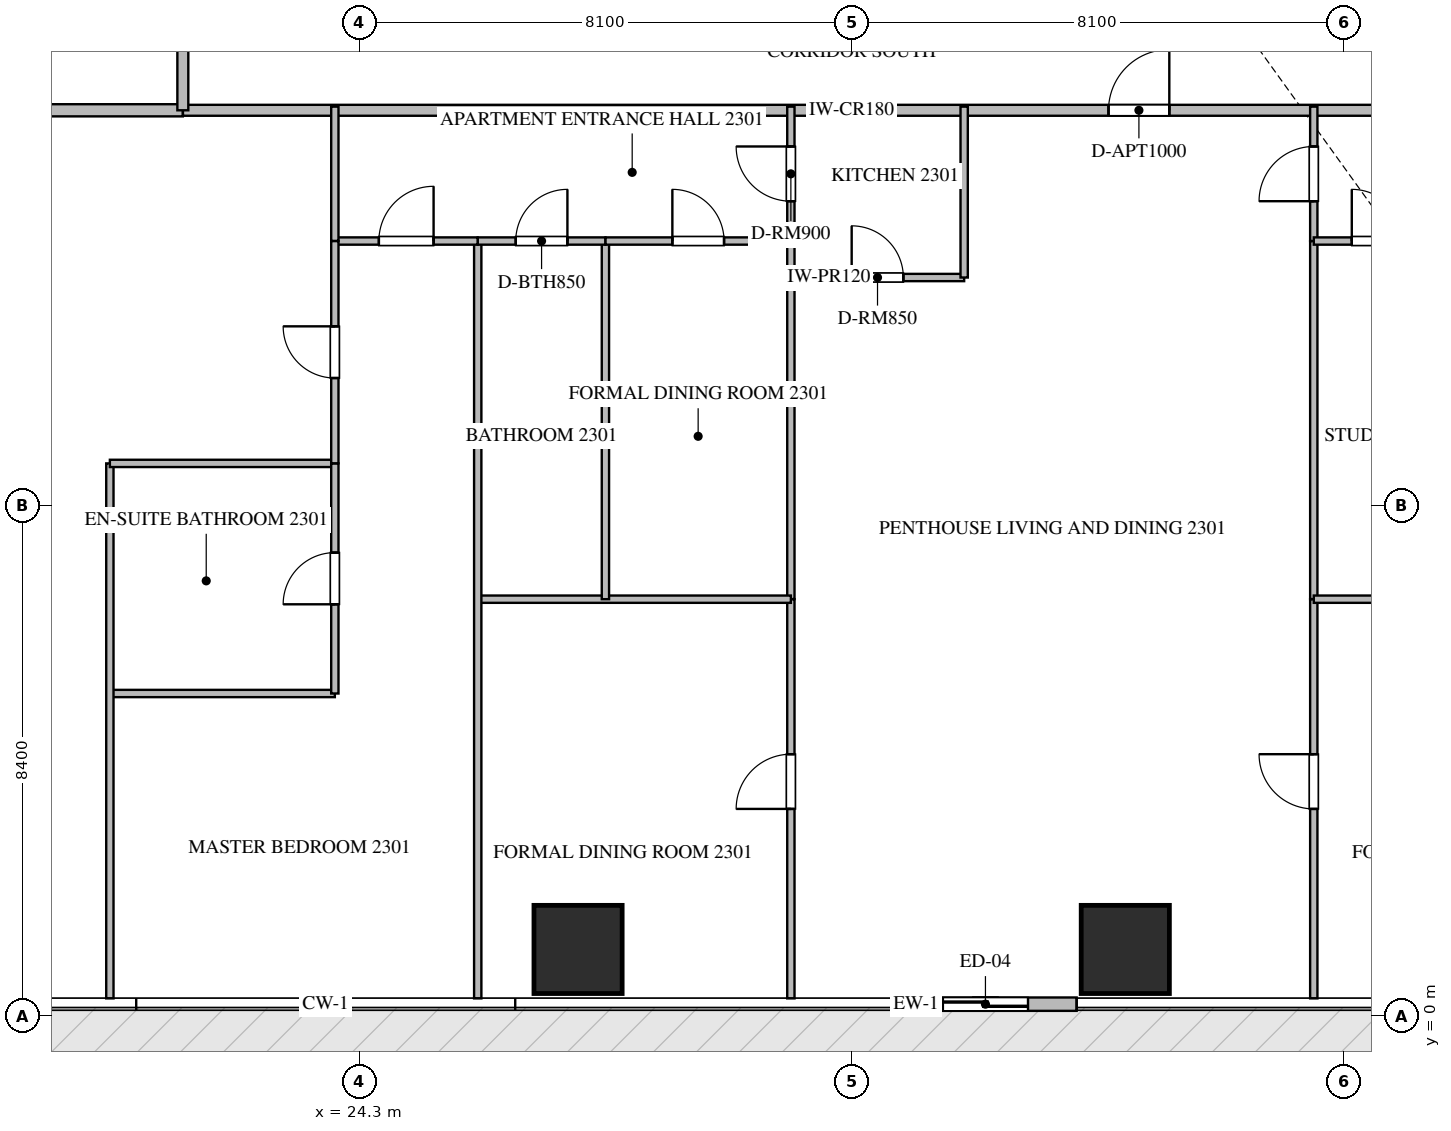
"""IFC4 building model, lengths in metres.
Left out: names, types, materials, properties, quantities, classifications, styles, units other than length and angle.
Written with IfcOpenShell. Run it as: python <this file> out.ifc"""

import sys

from ifc_helpers import new_model, si_unit, direction, frame, frame_2d, origin, origin_2d, place, context, subcontext, project, spatial, rectangle, extrude, source, transform, mapped, element, fill, save


model = new_model("IFC4")
c1 = context("Model", 3, precision=1e-05, world=origin(), true_north=direction((0.0, 1.0)))
c2 = subcontext(c1, "Body", "Model", "MODEL_VIEW")
j1 = project(units=[si_unit("LENGTHUNIT", "METRE"), si_unit("PLANEANGLEUNIT", "RADIAN")], contexts=[c1])
p1 = place(None, origin())
s1 = spatial("IfcSite", under=j1, at=p1, CompositionType="ELEMENT")
p2 = place(p1, origin())
s2 = spatial("IfcBuilding", under=s1, at=p2, CompositionType="ELEMENT")
p3 = place(p2, frame((0.0, 0.0, 94.2)))
s3 = spatial("IfcBuildingStorey", under=s2, at=p3, CompositionType="ELEMENT", Elevation=94.2)
m1 = source(origin(), c2, "Body", "SweptSolid", [
    extrude(rectangle(XDim=1.45, YDim=1.45, at=origin_2d()), origin(), (0.0, 0.0, 1.0), 3.75),
])
for number, where, z_axis, x_axis in (
    (1, (27.9, 1.1, -0.26), (0.0, 0.0, 1.0), (1.0, 0.0, 0.0)),
    (2, (36.9, 1.1, -0.26), (0.0, 0.0, 1.0), (1.0, 0.0, 0.0)),
):
    element("IfcColumn", number, at=place(p3, frame(where, z_axis=z_axis, x_axis=x_axis)), inside=s3, PredefinedType="COLUMN", context=c2, shape_type="MappedRepresentation", body=[
        mapped(m1, transform((0.0, 0.0, 0.0), scale=1.0)),
    ])
p4 = place(p3, frame((33.1, 0.2, 0.0), z_axis=(0.0, 0.0, 1.0), x_axis=(1.0, 0.0, 0.0)))
e3 = element("IfcWall", 3, at=p4, inside=s3, PredefinedType="ELEMENTEDWALL", context=c2, shape_type="SweptSolid", body=[
    extrude(rectangle(XDim=3.0, YDim=0.22, at=frame_2d((1.5, 0.0))), origin(), (0.0, 0.0, 1.0), 3.475),
])
p5 = place(p4, frame((0.8, 0.0, 0.0)))
e4 = element("IfcOpeningElement", 4, at=p5, cuts=e3, PredefinedType="OPENING", context=c2, shape_type="SweptSolid", body=[
    extrude(rectangle(XDim=1.4, YDim=2.25, at=frame_2d((0.7, 1.125))), frame((0.0, 0.12, 0.0), z_axis=(0.0, -1.0, 0.0), x_axis=(1.0, 0.0, 0.0)), (0.0, 0.0, 1.0), 0.24),
])
p6 = place(p3, frame((6.082, 14.9, 0.0), z_axis=(0.0, 0.0, 1.0), x_axis=(1.0, 0.0, 0.0)))
e5 = element("IfcWall", 5, at=p6, inside=s3, PredefinedType="PARTITIONING", context=c2, shape_type="SweptSolid", body=[
    extrude(rectangle(XDim=15.318, YDim=0.2, at=frame_2d((7.659, 0.0))), origin(), (0.0, 0.0, 1.0), 3.49),
])
p7 = place(p3, frame((21.402, 14.9, 0.0), z_axis=(0.0, 0.0, 1.0), x_axis=(1.0, 0.0, 0.0)))
e6 = element("IfcWall", 6, at=p7, inside=s3, PredefinedType="PARTITIONING", context=c2, shape_type="SweptSolid", body=[
    extrude(rectangle(XDim=21.996, YDim=0.18, at=frame_2d((10.998, 0.0))), origin(), (0.0, 0.0, 1.0), 3.49),
])
p8 = place(p7, frame((15.222, 0.0, 0.0)))
e7 = element("IfcOpeningElement", 7, at=p8, cuts=e6, PredefinedType="OPENING", context=c2, shape_type="SweptSolid", body=[
    extrude(rectangle(XDim=1.0, YDim=2.15, at=frame_2d((0.5, 1.075))), frame((0.0, 0.1, 0.0), z_axis=(0.0, -1.0, 0.0), x_axis=(1.0, 0.0, 0.0)), (0.0, 0.0, 1.0), 0.2),
])
p9 = place(p3, frame((21.4, 14.9, 0.0), z_axis=(0.0, 0.0, 1.0), x_axis=(0.0, 1.0, 0.0)))
e8 = element("IfcWall", 8, at=p9, inside=s3, PredefinedType="PARTITIONING", context=c2, shape_type="SweptSolid", body=[
    extrude(rectangle(XDim=20.6, YDim=0.18, at=frame_2d((10.3, 0.0))), origin(), (0.0, 0.0, 1.0), 3.49),
])
p10 = place(p9, frame((1.96, 0.0, 0.0)))
e9 = element("IfcOpeningElement", 9, at=p10, cuts=e8, PredefinedType="OPENING", context=c2, shape_type="SweptSolid", body=[
    extrude(rectangle(XDim=1.0, YDim=2.15, at=frame_2d((0.5, 1.075))), frame((0.0, 0.1, 0.0), z_axis=(0.0, -1.0, 0.0), x_axis=(1.0, 0.0, 0.0)), (0.0, 0.0, 1.0), 0.2),
])
p11 = place(p3, frame((31.4, 12.15, 0.0), z_axis=(0.0, 0.0, 1.0), x_axis=(1.0, 0.0, 0.0)))
e10 = element("IfcWall", 10, at=p11, inside=s3, PredefinedType="PARTITIONING", context=c2, shape_type="SweptSolid", body=[
    extrude(rectangle(XDim=2.85, YDim=0.12, at=frame_2d((1.425, 0.0))), origin(), (0.0, 0.0, 1.0), 3.49),
])
p12 = place(p11, frame((1.0, 0.0, 0.0)))
e11 = element("IfcOpeningElement", 11, at=p12, cuts=e10, PredefinedType="OPENING", context=c2, shape_type="SweptSolid", body=[
    extrude(rectangle(XDim=0.85, YDim=2.1, at=frame_2d((0.425, 1.05))), frame((0.0, 0.07, 0.0), z_axis=(0.0, -1.0, 0.0), x_axis=(1.0, 0.0, 0.0)), (0.0, 0.0, 1.0), 0.14),
])
p13 = place(p3, frame((34.25, 12.15, 0.0), z_axis=(0.0, 0.0, 1.0), x_axis=(0.0, 1.0, 0.0)))
e12 = element("IfcWall", 12, at=p13, inside=s3, PredefinedType="PARTITIONING", context=c2, shape_type="SweptSolid", body=[
    extrude(rectangle(XDim=2.81, YDim=0.12, at=frame_2d((1.405, 0.0))), origin(), (0.0, 0.0, 1.0), 3.49),
])
p14 = place(p3, frame((31.4, 12.75, 0.0), z_axis=(0.0, 0.0, 1.0), x_axis=(0.0, 1.0, 0.0)))
e13 = element("IfcWall", 13, at=p14, inside=s3, PredefinedType="PARTITIONING", context=c2, shape_type="SweptSolid", body=[
    extrude(rectangle(XDim=2.21, YDim=0.12, at=frame_2d((1.105, 0.0))), origin(), (0.0, 0.0, 1.0), 3.49),
])
p15 = place(p14, frame((0.655, 0.0, 0.0)))
e14 = element("IfcOpeningElement", 14, at=p15, cuts=e13, PredefinedType="OPENING", context=c2, shape_type="SweptSolid", body=[
    extrude(rectangle(XDim=0.9, YDim=2.1, at=frame_2d((0.45, 1.05))), frame((0.0, 0.07, 0.0), z_axis=(0.0, -1.0, 0.0), x_axis=(1.0, 0.0, 0.0)), (0.0, 0.0, 1.0), 0.14),
])
p16 = place(p3, frame((31.4, 0.295, 0.0), z_axis=(0.0, 0.0, 1.0), x_axis=(0.0, 1.0, 0.0)))
e15 = element("IfcWall", 15, at=p16, inside=s3, PredefinedType="PARTITIONING", context=c2, shape_type="SweptSolid", body=[
    extrude(rectangle(XDim=6.565, YDim=0.12, at=frame_2d((3.283, 0.0))), origin(), (0.0, 0.0, 1.0), 3.49),
])
p17 = place(p16, frame((3.116, 0.0, 0.0)))
e16 = element("IfcOpeningElement", 16, at=p17, cuts=e15, PredefinedType="OPENING", context=c2, shape_type="SweptSolid", body=[
    extrude(rectangle(XDim=0.9, YDim=2.1, at=frame_2d((0.45, 1.05))), frame((0.0, 0.07, 0.0), z_axis=(0.0, -1.0, 0.0), x_axis=(1.0, 0.0, 0.0)), (0.0, 0.0, 1.0), 0.14),
])
p18 = place(p3, frame((31.4, 6.862, 0.0), z_axis=(0.0, 0.0, 1.0), x_axis=(0.0, 1.0, 0.0)))
e17 = element("IfcWall", 17, at=p18, inside=s3, PredefinedType="PARTITIONING", context=c2, shape_type="SweptSolid", body=[
    extrude(rectangle(XDim=5.886, YDim=0.12, at=frame_2d((2.943, 0.0))), origin(), (0.0, 0.0, 1.0), 3.49),
])
p19 = place(p3, frame((26.25, 6.86, 0.0), z_axis=(0.0, 0.0, 1.0), x_axis=(1.0, 0.0, 0.0)))
e18 = element("IfcWall", 18, at=p19, inside=s3, PredefinedType="PARTITIONING", context=c2, shape_type="SweptSolid", body=[
    extrude(rectangle(XDim=5.15, YDim=0.12, at=frame_2d((2.575, 0.0))), origin(), (0.0, 0.0, 1.0), 3.49),
])
p20 = place(p3, frame((26.25, 0.295, 0.0), z_axis=(0.0, 0.0, 1.0), x_axis=(0.0, 1.0, 0.0)))
e19 = element("IfcWall", 19, at=p20, inside=s3, PredefinedType="PARTITIONING", context=c2, shape_type="SweptSolid", body=[
    extrude(rectangle(XDim=12.455, YDim=0.12, at=frame_2d((6.228, 0.0))), origin(), (0.0, 0.0, 1.0), 3.49),
])
p21 = place(p3, frame((28.35, 6.86, 0.0), z_axis=(0.0, 0.0, 1.0), x_axis=(0.0, 1.0, 0.0)))
e20 = element("IfcWall", 20, at=p21, inside=s3, PredefinedType="PARTITIONING", context=c2, shape_type="SweptSolid", body=[
    extrude(rectangle(XDim=5.89, YDim=0.12, at=frame_2d((2.945, 0.0))), origin(), (0.0, 0.0, 1.0), 3.49),
])
p22 = place(p3, frame((26.25, 12.75, 0.0), z_axis=(0.0, 0.0, 1.0), x_axis=(1.0, 0.0, 0.0)))
e21 = element("IfcWall", 21, at=p22, inside=s3, PredefinedType="PARTITIONING", context=c2, shape_type="SweptSolid", body=[
    extrude(rectangle(XDim=2.1, YDim=0.12, at=frame_2d((1.05, 0.0))), origin(), (0.0, 0.0, 1.0), 3.49),
])
p23 = place(p22, frame((0.625, 0.0, 0.0)))
e22 = element("IfcOpeningElement", 22, at=p23, cuts=e21, PredefinedType="OPENING", context=c2, shape_type="SweptSolid", body=[
    extrude(rectangle(XDim=0.85, YDim=2.1, at=frame_2d((0.425, 1.05))), frame((0.0, 0.07, 0.0), z_axis=(0.0, -1.0, 0.0), x_axis=(1.0, 0.0, 0.0)), (0.0, 0.0, 1.0), 0.14),
])
p24 = place(p3, frame((28.352, 12.75, 0.0), z_axis=(0.0, 0.0, 1.0), x_axis=(1.0, 0.0, 0.0)))
e23 = element("IfcWall", 23, at=p24, inside=s3, PredefinedType="PARTITIONING", context=c2, shape_type="SweptSolid", body=[
    extrude(rectangle(XDim=3.048, YDim=0.12, at=frame_2d((1.524, 0.0))), origin(), (0.0, 0.0, 1.0), 3.49),
])
p25 = place(p24, frame((1.099, 0.0, 0.0)))
e24 = element("IfcOpeningElement", 24, at=p25, cuts=e23, PredefinedType="OPENING", context=c2, shape_type="SweptSolid", body=[
    extrude(rectangle(XDim=0.85, YDim=2.1, at=frame_2d((0.425, 1.05))), frame((0.0, 0.07, 0.0), z_axis=(0.0, -1.0, 0.0), x_axis=(1.0, 0.0, 0.0)), (0.0, 0.0, 1.0), 0.14),
])
p26 = place(p3, frame((23.9, 12.75, 0.0), z_axis=(0.0, 0.0, 1.0), x_axis=(1.0, 0.0, 0.0)))
e25 = element("IfcWall", 25, at=p26, inside=s3, PredefinedType="PARTITIONING", context=c2, shape_type="SweptSolid", body=[
    extrude(rectangle(XDim=2.348, YDim=0.12, at=frame_2d((1.174, 0.0))), origin(), (0.0, 0.0, 1.0), 3.49),
])
p27 = place(p26, frame((0.724, 0.0, 0.0)))
e26 = element("IfcOpeningElement", 26, at=p27, cuts=e25, PredefinedType="OPENING", context=c2, shape_type="SweptSolid", body=[
    extrude(rectangle(XDim=0.9, YDim=2.1, at=frame_2d((0.45, 1.05))), frame((0.0, 0.07, 0.0), z_axis=(0.0, -1.0, 0.0), x_axis=(1.0, 0.0, 0.0)), (0.0, 0.0, 1.0), 0.14),
])
p28 = place(p3, frame((20.2, 5.309, 0.0), z_axis=(0.0, 0.0, 1.0), x_axis=(1.0, 0.0, 0.0)))
e27 = element("IfcWall", 27, at=p28, inside=s3, PredefinedType="PARTITIONING", context=c2, shape_type="SweptSolid", body=[
    extrude(rectangle(XDim=3.7, YDim=0.12, at=frame_2d((1.85, 0.0))), origin(), (0.0, 0.0, 1.0), 3.49),
])
p29 = place(p3, frame((20.2, 0.295, 0.0), z_axis=(0.0, 0.0, 1.0), x_axis=(0.0, 1.0, 0.0)))
e28 = element("IfcWall", 28, at=p29, inside=s3, PredefinedType="PARTITIONING", context=c2, shape_type="SweptSolid", body=[
    extrude(rectangle(XDim=8.798, YDim=0.12, at=frame_2d((4.399, 0.0))), origin(), (0.0, 0.0, 1.0), 3.49),
])
p30 = place(p3, frame((20.2, 9.093, 0.0), z_axis=(0.0, 0.0, 1.0), x_axis=(1.0, 0.0, 0.0)))
e29 = element("IfcWall", 29, at=p30, inside=s3, PredefinedType="PARTITIONING", context=c2, shape_type="SweptSolid", body=[
    extrude(rectangle(XDim=3.7, YDim=0.12, at=frame_2d((1.85, 0.0))), origin(), (0.0, 0.0, 1.0), 3.49),
])
p31 = place(p3, frame((23.9, 5.309, 0.0), z_axis=(0.0, 0.0, 1.0), x_axis=(0.0, 1.0, 0.0)))
e30 = element("IfcWall", 30, at=p31, inside=s3, PredefinedType="PARTITIONING", context=c2, shape_type="SweptSolid", body=[
    extrude(rectangle(XDim=3.784, YDim=0.12, at=frame_2d((1.892, 0.0))), origin(), (0.0, 0.0, 1.0), 3.49),
])
p32 = place(p31, frame((1.467, 0.0, 0.0)))
e31 = element("IfcOpeningElement", 31, at=p32, cuts=e30, PredefinedType="OPENING", context=c2, shape_type="SweptSolid", body=[
    extrude(rectangle(XDim=0.85, YDim=2.1, at=frame_2d((0.425, 1.05))), frame((0.0, 0.07, 0.0), z_axis=(0.0, -1.0, 0.0), x_axis=(1.0, 0.0, 0.0)), (0.0, 0.0, 1.0), 0.14),
])
p33 = place(p3, frame((23.9, 9.095, 0.0), z_axis=(0.0, 0.0, 1.0), x_axis=(0.0, 1.0, 0.0)))
e32 = element("IfcWall", 32, at=p33, inside=s3, PredefinedType="PARTITIONING", context=c2, shape_type="SweptSolid", body=[
    extrude(rectangle(XDim=3.655, YDim=0.12, at=frame_2d((1.828, 0.0))), origin(), (0.0, 0.0, 1.0), 3.49),
])
p34 = place(p33, frame((1.402, 0.0, 0.0)))
e33 = element("IfcOpeningElement", 33, at=p34, cuts=e32, PredefinedType="OPENING", context=c2, shape_type="SweptSolid", body=[
    extrude(rectangle(XDim=0.85, YDim=2.1, at=frame_2d((0.425, 1.05))), frame((0.0, 0.07, 0.0), z_axis=(0.0, -1.0, 0.0), x_axis=(1.0, 0.0, 0.0)), (0.0, 0.0, 1.0), 0.14),
])
p35 = place(p3, frame((23.9, 12.752, 0.0), z_axis=(0.0, 0.0, 1.0), x_axis=(0.0, 1.0, 0.0)))
e34 = element("IfcWall", 34, at=p35, inside=s3, PredefinedType="PARTITIONING", context=c2, shape_type="SweptSolid", body=[
    extrude(rectangle(XDim=2.208, YDim=0.12, at=frame_2d((1.104, 0.0))), origin(), (0.0, 0.0, 1.0), 3.49),
])
p36 = place(p3, frame((40.0, 12.75, 0.0), z_axis=(0.0, 0.0, 1.0), x_axis=(0.0, 1.0, 0.0)))
e35 = element("IfcWall", 35, at=p36, inside=s3, PredefinedType="PARTITIONING", context=c2, shape_type="SweptSolid", body=[
    extrude(rectangle(XDim=2.21, YDim=0.12, at=frame_2d((1.105, 0.0))), origin(), (0.0, 0.0, 1.0), 3.49),
])
p37 = place(p36, frame((0.655, 0.0, 0.0)))
e36 = element("IfcOpeningElement", 36, at=p37, cuts=e35, PredefinedType="OPENING", context=c2, shape_type="SweptSolid", body=[
    extrude(rectangle(XDim=0.9, YDim=2.1, at=frame_2d((0.45, 1.05))), frame((0.0, 0.07, 0.0), z_axis=(0.0, -1.0, 0.0), x_axis=(1.0, 0.0, 0.0)), (0.0, 0.0, 1.0), 0.14),
])
p38 = place(p3, frame((40.0, 0.295, 0.0), z_axis=(0.0, 0.0, 1.0), x_axis=(0.0, 1.0, 0.0)))
e37 = element("IfcWall", 37, at=p38, inside=s3, PredefinedType="PARTITIONING", context=c2, shape_type="SweptSolid", body=[
    extrude(rectangle(XDim=6.565, YDim=0.12, at=frame_2d((3.283, 0.0))), origin(), (0.0, 0.0, 1.0), 3.49),
])
p39 = place(p38, frame((3.116, 0.0, 0.0)))
e38 = element("IfcOpeningElement", 38, at=p39, cuts=e37, PredefinedType="OPENING", context=c2, shape_type="SweptSolid", body=[
    extrude(rectangle(XDim=0.9, YDim=2.1, at=frame_2d((0.45, 1.05))), frame((0.0, 0.07, 0.0), z_axis=(0.0, -1.0, 0.0), x_axis=(1.0, 0.0, 0.0)), (0.0, 0.0, 1.0), 0.14),
])
p40 = place(p3, frame((40.0, 6.862, 0.0), z_axis=(0.0, 0.0, 1.0), x_axis=(0.0, 1.0, 0.0)))
e39 = element("IfcWall", 39, at=p40, inside=s3, PredefinedType="PARTITIONING", context=c2, shape_type="SweptSolid", body=[
    extrude(rectangle(XDim=5.886, YDim=0.12, at=frame_2d((2.943, 0.0))), origin(), (0.0, 0.0, 1.0), 3.49),
])
p41 = place(p3, frame((40.0, 6.86, 0.0), z_axis=(0.0, 0.0, 1.0), x_axis=(1.0, 0.0, 0.0)))
e40 = element("IfcWall", 40, at=p41, inside=s3, PredefinedType="PARTITIONING", context=c2, shape_type="SweptSolid", body=[
    extrude(rectangle(XDim=5.15, YDim=0.12, at=frame_2d((2.575, 0.0))), origin(), (0.0, 0.0, 1.0), 3.49),
])
p42 = place(p3, frame((40.0, 12.75, 0.0), z_axis=(0.0, 0.0, 1.0), x_axis=(1.0, 0.0, 0.0)))
e41 = element("IfcWall", 41, at=p42, inside=s3, PredefinedType="PARTITIONING", context=c2, shape_type="SweptSolid", body=[
    extrude(rectangle(XDim=2.1, YDim=0.12, at=frame_2d((1.05, 0.0))), origin(), (0.0, 0.0, 1.0), 3.49),
])
p43 = place(p42, frame((0.625, 0.0, 0.0)))
e42 = element("IfcOpeningElement", 42, at=p43, cuts=e41, PredefinedType="OPENING", context=c2, shape_type="SweptSolid", body=[
    extrude(rectangle(XDim=0.85, YDim=2.1, at=frame_2d((0.425, 1.05))), frame((0.0, 0.07, 0.0), z_axis=(0.0, -1.0, 0.0), x_axis=(1.0, 0.0, 0.0)), (0.0, 0.0, 1.0), 0.14),
])
m2 = source(origin(), c2, "Body", "SweptSolid", [
    extrude(rectangle(XDim=1.4, YDim=2.25, at=frame_2d((0.7, 1.125))), frame((0.0, 0.025, 0.0), z_axis=(0.0, -1.0, 0.0), x_axis=(1.0, 0.0, 0.0)), (0.0, 0.0, 1.0), 0.05),
])
p44 = place(p5, origin())
e43 = element("IfcDoor", 43, at=p44, inside=s3, OperationType="SLIDING_TO_LEFT", PredefinedType="DOOR", context=c2, shape_type="MappedRepresentation", body=[
    mapped(m2, transform((0.0, 0.0, 0.0), scale=1.0)),
])
fill(e4, e43)
m3 = source(origin(), c2, "Body", "SweptSolid", [
    extrude(rectangle(XDim=1.0, YDim=2.15, at=frame_2d((0.5, 1.075))), frame((0.0, 0.025, 0.0), z_axis=(0.0, -1.0, 0.0), x_axis=(1.0, 0.0, 0.0)), (0.0, 0.0, 1.0), 0.05),
])
p45 = place(p8, origin())
e44 = element("IfcDoor", 44, at=p45, inside=s3, OperationType="SINGLE_SWING_RIGHT", PredefinedType="DOOR", context=c2, shape_type="MappedRepresentation", body=[
    mapped(m3, transform((0.0, 0.0, 0.0), scale=1.0)),
])
fill(e7, e44)
m4 = source(origin(), c2, "Body", "SweptSolid", [
    extrude(rectangle(XDim=0.85, YDim=2.1, at=frame_2d((0.425, 1.05))), frame((0.0, 0.025, 0.0), z_axis=(0.0, -1.0, 0.0), x_axis=(1.0, 0.0, 0.0)), (0.0, 0.0, 1.0), 0.05),
])
p46 = place(p12, origin())
e45 = element("IfcDoor", 45, at=p46, inside=s3, OperationType="SINGLE_SWING_LEFT", PredefinedType="DOOR", context=c2, shape_type="MappedRepresentation", body=[
    mapped(m4, transform((0.0, 0.0, 0.0), scale=1.0)),
])
fill(e11, e45)
m5 = source(origin(), c2, "Body", "SweptSolid", [
    extrude(rectangle(XDim=0.9, YDim=2.1, at=frame_2d((0.45, 1.05))), frame((0.0, 0.025, 0.0), z_axis=(0.0, -1.0, 0.0), x_axis=(1.0, 0.0, 0.0)), (0.0, 0.0, 1.0), 0.05),
])
p47 = place(p15, origin())
e46 = element("IfcDoor", 46, at=p47, inside=s3, OperationType="SINGLE_SWING_RIGHT", PredefinedType="DOOR", context=c2, shape_type="MappedRepresentation", body=[
    mapped(m5, transform((0.0, 0.0, 0.0), scale=1.0)),
])
fill(e14, e46)
p48 = place(p17, origin())
e47 = element("IfcDoor", 47, at=p48, inside=s3, OperationType="SINGLE_SWING_LEFT", PredefinedType="DOOR", context=c2, shape_type="MappedRepresentation", body=[
    mapped(m5, transform((0.0, 0.0, 0.0), scale=1.0)),
])
fill(e16, e47)
p49 = place(p23, origin())
e48 = element("IfcDoor", 48, at=p49, inside=s3, OperationType="SINGLE_SWING_RIGHT", PredefinedType="DOOR", context=c2, shape_type="MappedRepresentation", body=[
    mapped(m4, transform((0.0, 0.0, 0.0), scale=1.0)),
])
fill(e22, e48)
p50 = place(p25, origin())
e49 = element("IfcDoor", 49, at=p50, inside=s3, OperationType="SINGLE_SWING_LEFT", PredefinedType="DOOR", context=c2, shape_type="MappedRepresentation", body=[
    mapped(m4, transform((0.0, 0.0, 0.0), scale=1.0)),
])
fill(e24, e49)
p51 = place(p27, origin())
e50 = element("IfcDoor", 50, at=p51, inside=s3, OperationType="SINGLE_SWING_RIGHT", PredefinedType="DOOR", context=c2, shape_type="MappedRepresentation", body=[
    mapped(m5, transform((0.0, 0.0, 0.0), scale=1.0)),
])
fill(e26, e50)
p52 = place(p32, origin())
e51 = element("IfcDoor", 51, at=p52, inside=s3, OperationType="SINGLE_SWING_LEFT", PredefinedType="DOOR", context=c2, shape_type="MappedRepresentation", body=[
    mapped(m4, transform((0.0, 0.0, 0.0), scale=1.0)),
])
fill(e31, e51)
p53 = place(p34, origin())
e52 = element("IfcDoor", 52, at=p53, inside=s3, OperationType="SINGLE_SWING_RIGHT", PredefinedType="DOOR", context=c2, shape_type="MappedRepresentation", body=[
    mapped(m4, transform((0.0, 0.0, 0.0), scale=1.0)),
])
fill(e33, e52)
p54 = place(p37, origin())
e53 = element("IfcDoor", 53, at=p54, inside=s3, OperationType="SINGLE_SWING_LEFT", PredefinedType="DOOR", context=c2, shape_type="MappedRepresentation", body=[
    mapped(m5, transform((0.0, 0.0, 0.0), scale=1.0)),
])
fill(e36, e53)
p55 = place(p39, origin())
e54 = element("IfcDoor", 54, at=p55, inside=s3, OperationType="SINGLE_SWING_RIGHT", PredefinedType="DOOR", context=c2, shape_type="MappedRepresentation", body=[
    mapped(m5, transform((0.0, 0.0, 0.0), scale=1.0)),
])
fill(e38, e54)
p56 = place(p43, origin())
e55 = element("IfcDoor", 55, at=p56, inside=s3, OperationType="SINGLE_SWING_LEFT", PredefinedType="DOOR", context=c2, shape_type="MappedRepresentation", body=[
    mapped(m4, transform((0.0, 0.0, 0.0), scale=1.0)),
])
fill(e42, e55)
save(model, sys.argv[1])
